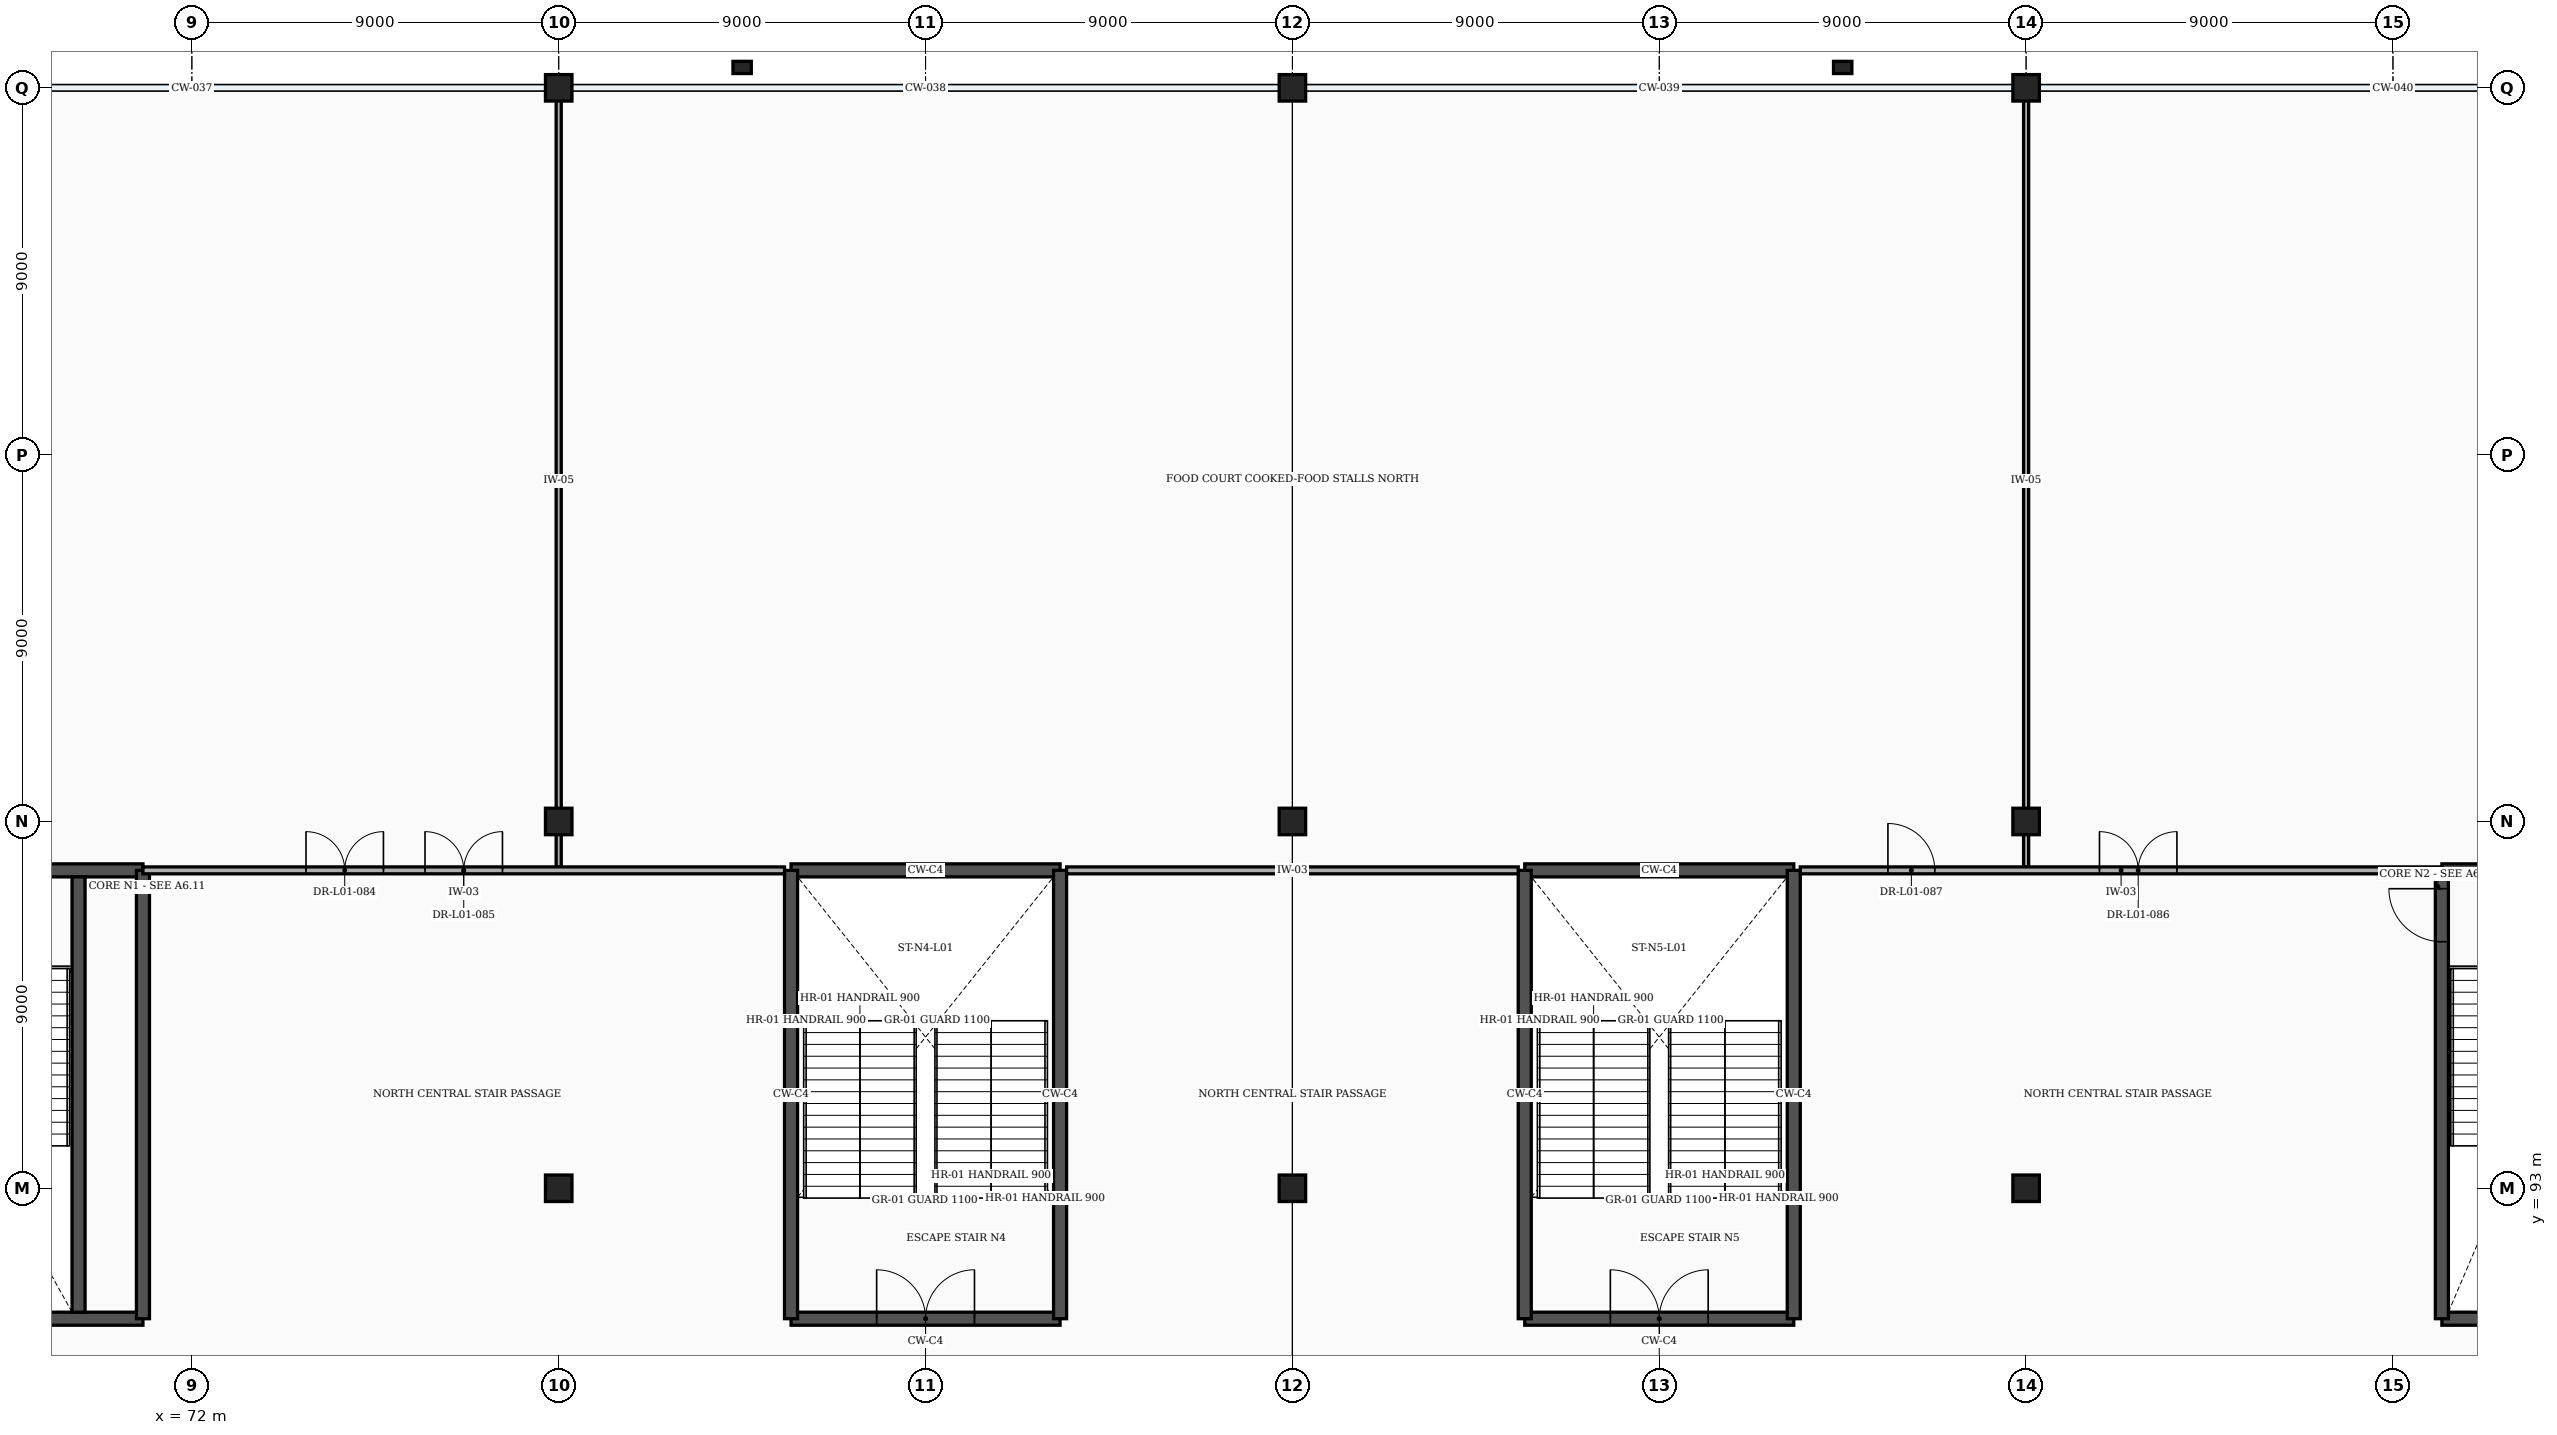
"""IFC4 building model, lengths in metres.
Left out: names, types, materials, properties, quantities, classifications, styles, units other than length and angle.
Written with IfcOpenShell. Run it as: python <this file> out.ifc"""

import sys

from ifc_helpers import new_model, si_unit, direction, frame, frame_2d, origin, origin_2d, place, context, subcontext, project, spatial, rectangle, extrude, element, fill, save


model = new_model("IFC4")
c1 = context("Model", 3, precision=1e-05, world=origin(), true_north=direction((0.0, 1.0)))
c2 = subcontext(c1, "Body", "Model", "MODEL_VIEW")
j1 = project(units=[si_unit("LENGTHUNIT", "METRE"), si_unit("PLANEANGLEUNIT", "RADIAN")], contexts=[c1])
p1 = place(None, origin())
s1 = spatial("IfcSite", under=j1, at=p1, CompositionType="ELEMENT")
p2 = place(p1, origin())
s2 = spatial("IfcBuilding", under=s1, at=p2, CompositionType="ELEMENT")
p3 = place(p2, frame((0.0, 0.0, 6.0)))
s3 = spatial("IfcBuildingStorey", under=s2, at=p3, CompositionType="ELEMENT", Elevation=6.0)
for number, where, z_axis, x_axis in (
    (1, (81.0, 93.0, 0.0), (0.0, 0.0, 1.0), (1.0, 0.0, 0.0)),
    (2, (81.0, 102.0, 0.0), (0.0, 0.0, 1.0), (1.0, 0.0, 0.0)),
    (3, (81.0, 120.0, 0.0), (0.0, 0.0, 1.0), (1.0, 0.0, 0.0)),
    (4, (99.0, 93.0, 0.0), (0.0, 0.0, 1.0), (1.0, 0.0, 0.0)),
    (5, (99.0, 102.0, 0.0), (0.0, 0.0, 1.0), (1.0, 0.0, 0.0)),
    (6, (99.0, 120.0, 0.0), (0.0, 0.0, 1.0), (1.0, 0.0, 0.0)),
    (7, (117.0, 93.0, 0.0), (0.0, 0.0, 1.0), (1.0, 0.0, 0.0)),
    (8, (117.0, 102.0, 0.0), (0.0, 0.0, 1.0), (1.0, 0.0, 0.0)),
    (9, (117.0, 120.0, 0.0), (0.0, 0.0, 1.0), (1.0, 0.0, 0.0)),
):
    element("IfcColumn", number, at=place(p3, frame(where, z_axis=z_axis, x_axis=x_axis)), inside=s3, PredefinedType="COLUMN", context=c2, shape_type="SweptSolid", body=[
        extrude(rectangle(XDim=0.65, YDim=0.65, at=origin_2d()), origin(), (0.0, 0.0, 1.0), 5.4),
    ])
for number, where, z_axis, x_axis in (
    (10, (85.5, 120.5, 0.0), (0.0, 0.0, 1.0), (1.0, 0.0, 0.0)),
    (11, (112.5, 120.5, 0.0), (0.0, 0.0, 1.0), (1.0, 0.0, 0.0)),
):
    element("IfcColumn", number, at=place(p3, frame(where, z_axis=z_axis, x_axis=x_axis)), inside=s3, PredefinedType="PILASTER", context=c2, shape_type="SweptSolid", body=[
        extrude(rectangle(XDim=0.45, YDim=0.3, at=origin_2d()), origin(), (0.0, 0.0, 1.0), 5.4),
    ])
for number, where, z_axis, x_axis in (
    (12, (64.2, 89.8, 0.0), (0.0, 0.0, 1.0), (1.0, 0.0, 0.0)),
    (13, (64.2, 100.8, 0.0), (0.0, 0.0, 1.0), (1.0, 0.0, 0.0)),
):
    element("IfcWall", number, at=place(p3, frame(where, z_axis=z_axis, x_axis=x_axis)), inside=s3, PredefinedType="SHEAR", context=c2, shape_type="SweptSolid", body=[
        extrude(rectangle(XDim=6.6, YDim=0.32, at=frame_2d((3.3, 0.0))), origin(), (0.0, 0.0, 1.0), 5.15),
    ])
p4 = place(p3, frame((70.8, 89.8, 0.0), z_axis=(0.0, 0.0, 1.0), x_axis=(0.0, 1.0, 0.0)))
e14 = element("IfcWall", 14, at=p4, inside=s3, PredefinedType="SHEAR", context=c2, shape_type="SweptSolid", body=[
    extrude(rectangle(XDim=11.0, YDim=0.32, at=frame_2d((5.5, 0.0))), origin(), (0.0, 0.0, 1.0), 5.15),
])
p5 = place(p3, frame((69.22, 89.96, 0.0), z_axis=(0.0, 0.0, 1.0), x_axis=(0.0, 1.0, 0.0)))
e15 = element("IfcWall", 15, at=p5, inside=s3, PredefinedType="SHEAR", context=c2, shape_type="SweptSolid", body=[
    extrude(rectangle(XDim=10.68, YDim=0.32, at=frame_2d((5.34, 0.0))), origin(), (0.0, 0.0, 1.0), 5.15),
])
p6 = place(p3, frame((127.2, 89.8, 0.0), z_axis=(0.0, 0.0, 1.0), x_axis=(1.0, 0.0, 0.0)))
e16 = element("IfcWall", 16, at=p6, inside=s3, PredefinedType="SHEAR", context=c2, shape_type="SweptSolid", body=[
    extrude(rectangle(XDim=6.6, YDim=0.32, at=frame_2d((3.3, 0.0))), origin(), (0.0, 0.0, 1.0), 5.15),
])
p7 = place(p6, frame((4.45, 0.0, 0.0)))
e17 = element("IfcOpeningElement", 17, at=p7, cuts=e16, PredefinedType="OPENING", context=c2, shape_type="SweptSolid", body=[
    extrude(rectangle(XDim=1.6, YDim=2.3, at=frame_2d((0.8, 1.15))), frame((0.0, 0.172, 0.0), z_axis=(0.0, -1.0, 0.0), x_axis=(1.0, 0.0, 0.0)), (0.0, 0.0, 1.0), 0.344),
])
p8 = place(p3, frame((127.2, 100.8, 0.0), z_axis=(0.0, 0.0, 1.0), x_axis=(1.0, 0.0, 0.0)))
e18 = element("IfcWall", 18, at=p8, inside=s3, PredefinedType="SHEAR", context=c2, shape_type="SweptSolid", body=[
    extrude(rectangle(XDim=6.6, YDim=0.32, at=frame_2d((3.3, 0.0))), origin(), (0.0, 0.0, 1.0), 5.15),
])
p9 = place(p3, frame((127.2, 89.8, 0.0), z_axis=(0.0, 0.0, 1.0), x_axis=(0.0, 1.0, 0.0)))
e19 = element("IfcWall", 19, at=p9, inside=s3, PredefinedType="SHEAR", context=c2, shape_type="SweptSolid", body=[
    extrude(rectangle(XDim=11.0, YDim=0.32, at=frame_2d((5.5, 0.0))), origin(), (0.0, 0.0, 1.0), 5.15),
])
p10 = place(p9, frame((9.25, 0.0, 0.0)))
e20 = element("IfcOpeningElement", 20, at=p10, cuts=e19, PredefinedType="OPENING", context=c2, shape_type="SweptSolid", body=[
    extrude(rectangle(XDim=1.3, YDim=2.2, at=frame_2d((0.65, 1.1))), frame((0.0, 0.172, 0.0), z_axis=(0.0, -1.0, 0.0), x_axis=(1.0, 0.0, 0.0)), (0.0, 0.0, 1.0), 0.344),
])
p11 = place(p3, frame((86.7, 89.8, 0.0), z_axis=(0.0, 0.0, 1.0), x_axis=(1.0, 0.0, 0.0)))
e21 = element("IfcWall", 21, at=p11, inside=s3, PredefinedType="SHEAR", context=c2, shape_type="SweptSolid", body=[
    extrude(rectangle(XDim=6.6, YDim=0.32, at=frame_2d((3.3, 0.0))), origin(), (0.0, 0.0, 1.0), 5.15),
])
p12 = place(p11, frame((2.1, 0.0, 0.0)))
e22 = element("IfcOpeningElement", 22, at=p12, cuts=e21, PredefinedType="OPENING", context=c2, shape_type="SweptSolid", body=[
    extrude(rectangle(XDim=2.4, YDim=2.25, at=frame_2d((1.2, 1.125))), frame((0.0, 0.172, 0.0), z_axis=(0.0, -1.0, 0.0), x_axis=(1.0, 0.0, 0.0)), (0.0, 0.0, 1.0), 0.344),
])
p13 = place(p3, frame((86.7, 100.8, 0.0), z_axis=(0.0, 0.0, 1.0), x_axis=(1.0, 0.0, 0.0)))
e23 = element("IfcWall", 23, at=p13, inside=s3, PredefinedType="SHEAR", context=c2, shape_type="SweptSolid", body=[
    extrude(rectangle(XDim=6.6, YDim=0.32, at=frame_2d((3.3, 0.0))), origin(), (0.0, 0.0, 1.0), 5.15),
])
for number, where, z_axis, x_axis in (
    (24, (86.7, 89.8, 0.0), (0.0, 0.0, 1.0), (0.0, 1.0, 0.0)),
    (25, (93.3, 89.8, 0.0), (0.0, 0.0, 1.0), (0.0, 1.0, 0.0)),
):
    element("IfcWall", number, at=place(p3, frame(where, z_axis=z_axis, x_axis=x_axis)), inside=s3, PredefinedType="SHEAR", context=c2, shape_type="SweptSolid", body=[
        extrude(rectangle(XDim=11.0, YDim=0.32, at=frame_2d((5.5, 0.0))), origin(), (0.0, 0.0, 1.0), 5.15),
    ])
p14 = place(p3, frame((104.7, 89.8, 0.0), z_axis=(0.0, 0.0, 1.0), x_axis=(1.0, 0.0, 0.0)))
e26 = element("IfcWall", 26, at=p14, inside=s3, PredefinedType="SHEAR", context=c2, shape_type="SweptSolid", body=[
    extrude(rectangle(XDim=6.6, YDim=0.32, at=frame_2d((3.3, 0.0))), origin(), (0.0, 0.0, 1.0), 5.15),
])
p15 = place(p14, frame((2.1, 0.0, 0.0)))
e27 = element("IfcOpeningElement", 27, at=p15, cuts=e26, PredefinedType="OPENING", context=c2, shape_type="SweptSolid", body=[
    extrude(rectangle(XDim=2.4, YDim=2.25, at=frame_2d((1.2, 1.125))), frame((0.0, 0.172, 0.0), z_axis=(0.0, -1.0, 0.0), x_axis=(1.0, 0.0, 0.0)), (0.0, 0.0, 1.0), 0.344),
])
p16 = place(p3, frame((104.7, 100.8, 0.0), z_axis=(0.0, 0.0, 1.0), x_axis=(1.0, 0.0, 0.0)))
e28 = element("IfcWall", 28, at=p16, inside=s3, PredefinedType="SHEAR", context=c2, shape_type="SweptSolid", body=[
    extrude(rectangle(XDim=6.6, YDim=0.32, at=frame_2d((3.3, 0.0))), origin(), (0.0, 0.0, 1.0), 5.15),
])
for number, where, z_axis, x_axis in (
    (29, (104.7, 89.8, 0.0), (0.0, 0.0, 1.0), (0.0, 1.0, 0.0)),
    (30, (111.3, 89.8, 0.0), (0.0, 0.0, 1.0), (0.0, 1.0, 0.0)),
):
    element("IfcWall", number, at=place(p3, frame(where, z_axis=z_axis, x_axis=x_axis)), inside=s3, PredefinedType="SHEAR", context=c2, shape_type="SweptSolid", body=[
        extrude(rectangle(XDim=11.0, YDim=0.32, at=frame_2d((5.5, 0.0))), origin(), (0.0, 0.0, 1.0), 5.15),
    ])
for number, where, z_axis, x_axis in (
    (31, (81.0, 100.885, 0.0), (0.0, 0.0, 1.0), (0.0, 1.0, 0.0)),
    (32, (117.0, 100.885, 0.0), (0.0, 0.0, 1.0), (0.0, 1.0, 0.0)),
):
    element("IfcWall", number, at=place(p3, frame(where, z_axis=z_axis, x_axis=x_axis)), inside=s3, PredefinedType="PARTITIONING", context=c2, shape_type="SweptSolid", body=[
        extrude(rectangle(XDim=18.958, YDim=0.125, at=frame_2d((9.479, 0.0))), origin(), (0.0, 0.0, 1.0), 4.538),
    ])
p17 = place(p3, frame((70.8, 100.8, 0.0), z_axis=(0.0, 0.0, 1.0), x_axis=(1.0, 0.0, 0.0)))
e33 = element("IfcWall", 33, at=p17, inside=s3, PredefinedType="PARTITIONING", context=c2, shape_type="SweptSolid", body=[
    extrude(rectangle(XDim=15.74, YDim=0.17, at=frame_2d((7.87, 0.0))), origin(), (0.0, 0.0, 1.0), 5.15),
])
p18 = place(p17, frame((4.0, 0.0, 0.0)))
e34 = element("IfcOpeningElement", 34, at=p18, cuts=e33, PredefinedType="OPENING", context=c2, shape_type="SweptSolid", body=[
    extrude(rectangle(XDim=1.9, YDim=2.35, at=frame_2d((0.95, 1.175))), frame((0.0, 0.097, 0.0), z_axis=(0.0, -1.0, 0.0), x_axis=(1.0, 0.0, 0.0)), (0.0, 0.0, 1.0), 0.194),
])
p19 = place(p17, frame((6.92, 0.0, 0.0)))
e35 = element("IfcOpeningElement", 35, at=p19, cuts=e33, PredefinedType="OPENING", context=c2, shape_type="SweptSolid", body=[
    extrude(rectangle(XDim=1.9, YDim=2.35, at=frame_2d((0.95, 1.175))), frame((0.0, 0.097, 0.0), z_axis=(0.0, -1.0, 0.0), x_axis=(1.0, 0.0, 0.0)), (0.0, 0.0, 1.0), 0.194),
])
p20 = place(p3, frame((93.46, 100.8, 0.0), z_axis=(0.0, 0.0, 1.0), x_axis=(1.0, 0.0, 0.0)))
e36 = element("IfcWall", 36, at=p20, inside=s3, PredefinedType="PARTITIONING", context=c2, shape_type="SweptSolid", body=[
    extrude(rectangle(XDim=11.08, YDim=0.17, at=frame_2d((5.54, 0.0))), origin(), (0.0, 0.0, 1.0), 5.15),
])
p21 = place(p3, frame((111.46, 100.8, 0.0), z_axis=(0.0, 0.0, 1.0), x_axis=(1.0, 0.0, 0.0)))
e37 = element("IfcWall", 37, at=p21, inside=s3, PredefinedType="PARTITIONING", context=c2, shape_type="SweptSolid", body=[
    extrude(rectangle(XDim=15.74, YDim=0.17, at=frame_2d((7.87, 0.0))), origin(), (0.0, 0.0, 1.0), 5.15),
])
p22 = place(p21, frame((7.34, 0.0, 0.0)))
e38 = element("IfcOpeningElement", 38, at=p22, cuts=e37, PredefinedType="OPENING", context=c2, shape_type="SweptSolid", body=[
    extrude(rectangle(XDim=1.9, YDim=2.35, at=frame_2d((0.95, 1.175))), frame((0.0, 0.097, 0.0), z_axis=(0.0, -1.0, 0.0), x_axis=(1.0, 0.0, 0.0)), (0.0, 0.0, 1.0), 0.194),
])
p23 = place(p21, frame((2.15, 0.0, 0.0)))
e39 = element("IfcOpeningElement", 39, at=p23, cuts=e37, PredefinedType="OPENING", context=c2, shape_type="SweptSolid", body=[
    extrude(rectangle(XDim=1.15, YDim=2.15, at=frame_2d((0.575, 1.075))), frame((0.0, 0.097, 0.0), z_axis=(0.0, -1.0, 0.0), x_axis=(1.0, 0.0, 0.0)), (0.0, 0.0, 1.0), 0.194),
])
p24 = place(p10, origin())
e40 = element("IfcDoor", 40, at=p24, inside=s3, OperationType="SINGLE_SWING_RIGHT", PredefinedType="DOOR", context=c2, shape_type="SweptSolid", body=[
    extrude(rectangle(XDim=1.3, YDim=2.2, at=frame_2d((0.65, 1.1))), frame((0.0, 0.025, 0.0), z_axis=(0.0, -1.0, 0.0), x_axis=(1.0, 0.0, 0.0)), (0.0, 0.0, 1.0), 0.05),
])
fill(e20, e40)
p25 = place(p12, origin())
e41 = element("IfcDoor", 41, at=p25, inside=s3, OperationType="DOUBLE_DOOR_SINGLE_SWING", PredefinedType="DOOR", context=c2, shape_type="SweptSolid", body=[
    extrude(rectangle(XDim=2.4, YDim=2.25, at=frame_2d((1.2, 1.125))), frame((0.0, 0.025, 0.0), z_axis=(0.0, -1.0, 0.0), x_axis=(1.0, 0.0, 0.0)), (0.0, 0.0, 1.0), 0.05),
])
fill(e22, e41)
p26 = place(p15, origin())
e42 = element("IfcDoor", 42, at=p26, inside=s3, OperationType="DOUBLE_DOOR_SINGLE_SWING", PredefinedType="DOOR", context=c2, shape_type="SweptSolid", body=[
    extrude(rectangle(XDim=2.4, YDim=2.25, at=frame_2d((1.2, 1.125))), frame((0.0, 0.025, 0.0), z_axis=(0.0, -1.0, 0.0), x_axis=(1.0, 0.0, 0.0)), (0.0, 0.0, 1.0), 0.05),
])
fill(e27, e42)
p27 = place(p18, origin())
e43 = element("IfcDoor", 43, at=p27, inside=s3, OperationType="DOUBLE_DOOR_SINGLE_SWING", PredefinedType="DOOR", context=c2, shape_type="SweptSolid", body=[
    extrude(rectangle(XDim=1.9, YDim=2.35, at=frame_2d((0.95, 1.175))), frame((0.0, 0.025, 0.0), z_axis=(0.0, -1.0, 0.0), x_axis=(1.0, 0.0, 0.0)), (0.0, 0.0, 1.0), 0.05),
])
fill(e34, e43)
p28 = place(p19, origin())
e44 = element("IfcDoor", 44, at=p28, inside=s3, OperationType="DOUBLE_DOOR_SINGLE_SWING", PredefinedType="DOOR", context=c2, shape_type="SweptSolid", body=[
    extrude(rectangle(XDim=1.9, YDim=2.35, at=frame_2d((0.95, 1.175))), frame((0.0, 0.025, 0.0), z_axis=(0.0, -1.0, 0.0), x_axis=(1.0, 0.0, 0.0)), (0.0, 0.0, 1.0), 0.05),
])
fill(e35, e44)
p29 = place(p22, origin())
e45 = element("IfcDoor", 45, at=p29, inside=s3, OperationType="DOUBLE_DOOR_SINGLE_SWING", PredefinedType="DOOR", context=c2, shape_type="SweptSolid", body=[
    extrude(rectangle(XDim=1.9, YDim=2.35, at=frame_2d((0.95, 1.175))), frame((0.0, 0.025, 0.0), z_axis=(0.0, -1.0, 0.0), x_axis=(1.0, 0.0, 0.0)), (0.0, 0.0, 1.0), 0.05),
])
fill(e38, e45)
p30 = place(p23, origin())
e46 = element("IfcDoor", 46, at=p30, inside=s3, OperationType="SINGLE_SWING_LEFT", PredefinedType="DOOR", context=c2, shape_type="SweptSolid", body=[
    extrude(rectangle(XDim=1.15, YDim=2.15, at=frame_2d((0.575, 1.075))), frame((0.0, 0.025, 0.0), z_axis=(0.0, -1.0, 0.0), x_axis=(1.0, 0.0, 0.0)), (0.0, 0.0, 1.0), 0.05),
])
fill(e39, e46)
save(model, sys.argv[1])
